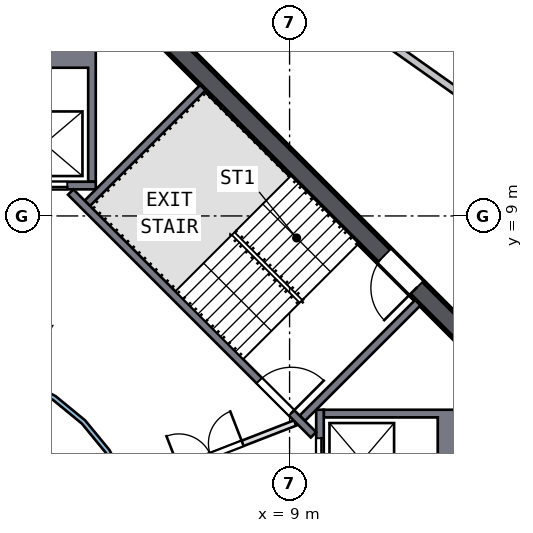
"""IFC4 building model, lengths in metres.
Left out: names, types, materials, properties, quantities, classifications, styles, units other than length and angle.
Written with IfcOpenShell. Run it as: python <this file> out.ifc"""

import sys

from ifc_helpers import new_model, si_unit, direction, frame, frame_2d, origin, place, context, subcontext, project, spatial, polyline, rectangle, outline, extrude, element, fill, save


model = new_model("IFC4")
c1 = context("Model", 3, precision=1e-05, world=origin(), true_north=direction((0.0, 1.0)))
c2 = subcontext(c1, "Body", "Model", "MODEL_VIEW")
j1 = project(units=[si_unit("LENGTHUNIT", "METRE"), si_unit("PLANEANGLEUNIT", "RADIAN")], contexts=[c1])
p1 = place(None, origin())
s1 = spatial("IfcSite", under=j1, at=p1, CompositionType="ELEMENT")
p2 = place(p1, origin())
s2 = spatial("IfcBuilding", under=s1, at=p2, CompositionType="ELEMENT")
p3 = place(p2, frame((0.0, 0.0, 256.0)))
s3 = spatial("IfcBuildingStorey", under=s2, at=p3, CompositionType="ELEMENT", Elevation=256.0)
p4 = place(p3, frame((13.823, 5.622, 0.0), z_axis=(0.0, 0.0, 1.0), x_axis=(-0.707106781, 0.707106781, 0.0)))
e1 = element("IfcWall", 1, at=p4, inside=s3, PredefinedType="SHEAR", context=c2, shape_type="SweptSolid", body=[
    extrude(rectangle(XDim=11.598, YDim=0.5, at=frame_2d((5.799, 0.0))), origin(), (0.0, 0.0, 1.0), 3.5),
])
p5 = place(p4, frame((2.099, 0.0, 0.0)))
e2 = element("IfcOpeningElement", 2, at=p5, cuts=e1, PredefinedType="OPENING", context=c2, shape_type="SweptSolid", body=[
    extrude(rectangle(XDim=1.2, YDim=2.1, at=frame_2d((0.6, 1.05))), frame((0.0, 0.26, 0.0), z_axis=(0.0, -1.0, 0.0), x_axis=(1.0, 0.0, 0.0)), (0.0, 0.0, 1.0), 0.52),
])
p6 = place(p3, origin())
e3 = element("IfcWall", 3, at=p6, inside=s3, PredefinedType="SOLIDWALL", context=c2, shape_type="SweptSolid", body=[
    extrude(outline(polyline([(13.5, 3.9), (13.5, 1.2), (9.9, 1.2), (9.9, 1.4), (12.9, 1.4), (12.9, 3.7), (9.9, 3.7), (9.9, 3.9), (13.5, 3.9)])), origin(), (0.0, 0.0, 1.0), 3.19),
])
p7 = place(p3, frame((9.8, 1.2, 0.0), z_axis=(0.0, 0.0, 1.0), x_axis=(0.0, 1.0, 0.0)))
e4 = element("IfcWall", 4, at=p7, inside=s3, PredefinedType="SOLIDWALL", context=c2, shape_type="SweptSolid", body=[
    extrude(rectangle(XDim=2.7, YDim=0.2, at=frame_2d((1.35, 0.0))), origin(), (0.0, 0.0, 1.0), 3.19),
])
p8 = place(p7, frame((0.75, 0.0, 0.0)))
e5 = element("IfcOpeningElement", 5, at=p8, cuts=e4, PredefinedType="OPENING", context=c2, shape_type="SweptSolid", body=[
    extrude(rectangle(XDim=1.2, YDim=2.1, at=frame_2d((0.6, 1.05))), frame((0.0, 0.11, 0.0), z_axis=(0.0, -1.0, 0.0), x_axis=(1.0, 0.0, 0.0)), (0.0, 0.0, 1.0), 0.22),
])
p9 = place(p3, origin())
e6 = element("IfcWall", 6, at=p9, inside=s3, PredefinedType="SOLIDWALL", context=c2, shape_type="SweptSolid", body=[
    extrude(outline(polyline([(3.9, 9.9), (3.7, 9.9), (3.7, 12.9), (1.4, 12.9), (1.4, 9.9), (1.2, 9.9), (1.2, 13.5), (3.9, 13.5), (3.9, 9.9)])), origin(), (0.0, 0.0, 1.0), 3.19),
])
p10 = place(p3, frame((1.2, 9.8, 0.0), z_axis=(0.0, 0.0, 1.0), x_axis=(1.0, 0.0, 0.0)))
e7 = element("IfcWall", 7, at=p10, inside=s3, PredefinedType="SOLIDWALL", context=c2, shape_type="SweptSolid", body=[
    extrude(rectangle(XDim=2.7, YDim=0.2, at=frame_2d((1.35, 0.0))), origin(), (0.0, 0.0, 1.0), 3.19),
])
p11 = place(p10, frame((0.75, 0.0, 0.0)))
e8 = element("IfcOpeningElement", 8, at=p11, cuts=e7, PredefinedType="OPENING", context=c2, shape_type="SweptSolid", body=[
    extrude(rectangle(XDim=1.2, YDim=2.1, at=frame_2d((0.6, 1.05))), frame((0.0, 0.11, 0.0), z_axis=(0.0, -1.0, 0.0), x_axis=(1.0, 0.0, 0.0)), (0.0, 0.0, 1.0), 0.22),
])
p12 = place(p3, frame((3.24, 9.629, 0.0), z_axis=(0.0, 0.0, 1.0), x_axis=(0.707106781, -0.707106781, 0.0)))
e9 = element("IfcWall", 9, at=p12, inside=s3, PredefinedType="SOLIDWALL", context=c2, shape_type="SweptSolid", body=[
    extrude(rectangle(XDim=9.036, YDim=0.2, at=frame_2d((4.518, 0.0))), origin(), (0.0, 0.0, 1.0), 3.19),
])
p13 = place(p12, frame((7.018, 0.0, 0.0)))
e10 = element("IfcOpeningElement", 10, at=p13, cuts=e9, PredefinedType="OPENING", context=c2, shape_type="SweptSolid", body=[
    extrude(rectangle(XDim=1.2, YDim=2.1, at=frame_2d((0.6, 1.05))), frame((0.0, 0.11, 0.0), z_axis=(0.0, -1.0, 0.0), x_axis=(1.0, 0.0, 0.0)), (0.0, 0.0, 1.0), 0.22),
])
for number, where, z_axis, x_axis in (
    (11, (9.334, 3.677, 0.0), (0.0, 0.0, 1.0), (0.707, 0.707, 0.0)),
    (12, (3.677, 9.334, 0.0), (0.0, 0.0, 1.0), (0.707, 0.707, 0.0)),
):
    element("IfcWall", number, at=place(p3, frame(where, z_axis=z_axis, x_axis=x_axis)), inside=s3, PredefinedType="SOLIDWALL", context=c2, shape_type="SweptSolid", body=[
        extrude(rectangle(XDim=4.3, YDim=0.2, at=frame_2d((2.15, 0.0))), origin(), (0.0, 0.0, 1.0), 3.19),
    ])
p14 = place(p3, frame((4.782, 1.857, 0.0), z_axis=(0.0, 0.0, 1.0), x_axis=(0.932155279, 0.362058746, 0.0)))
e13 = element("IfcWall", 13, at=p14, inside=s3, PredefinedType="PARTITIONING", context=c2, shape_type="SweptSolid", body=[
    extrude(rectangle(XDim=4.682, YDim=0.15, at=frame_2d((2.341, 0.0))), origin(), (0.0, 0.0, 1.0), 3.19),
])
p15 = place(p14, frame((1.4, 0.0, 0.0)))
e14 = element("IfcOpeningElement", 14, at=p15, cuts=e13, PredefinedType="OPENING", context=c2, shape_type="SweptSolid", body=[
    extrude(rectangle(XDim=1.8, YDim=2.1, at=frame_2d((0.9, 1.05))), frame((0.0, 0.085, 0.0), z_axis=(0.0, -1.0, 0.0), x_axis=(1.0, 0.0, 0.0)), (0.0, 0.0, 1.0), 0.17),
])
p16 = place(p3, origin())
e15 = element("IfcWall", 15, at=p16, inside=s3, PredefinedType="SOLIDWALL", context=c2, shape_type="SweptSolid", body=[
    extrude(outline(polyline([(5.021, -0.999), (4.73, -1.959), (4.257, -2.844), (3.62, -3.62), (2.844, -4.257), (1.959, -4.73), (0.999, -5.021), (0.0, -5.12), (-0.999, -5.021), (-1.959, -4.73), (-2.844, -4.257), (-3.62, -3.62), (-4.257, -2.844), (-4.73, -1.959), (-5.021, -0.999), (-5.12, 0.0), (-5.021, 0.999), (-4.73, 1.959), (-4.257, 2.844), (-3.62, 3.62), (-2.844, 4.257), (-1.959, 4.73), (-0.999, 5.021), (0.0, 5.12), (0.999, 5.021), (1.959, 4.73), (2.844, 4.257), (3.62, 3.62), (4.257, 2.844), (4.73, 1.959), (5.021, 0.999), (5.12, 0.0), (5.021, -0.999)]), holes=[polyline([(4.904, 0.976), (4.619, 1.913), (4.157, 2.778), (3.535, 3.535), (2.778, 4.157), (1.913, 4.619), (0.976, 4.904), (0.0, 5.0), (-0.976, 4.904), (-1.913, 4.619), (-2.778, 4.157), (-3.535, 3.535), (-4.157, 2.778), (-4.619, 1.913), (-4.904, 0.976), (-5.0, 0.0), (-4.904, -0.976), (-4.619, -1.913), (-4.157, -2.778), (-3.535, -3.535), (-2.778, -4.157), (-1.913, -4.619), (-0.976, -4.904), (0.0, -5.0), (0.976, -4.904), (1.913, -4.619), (2.778, -4.157), (3.535, -3.535), (4.157, -2.778), (4.619, -1.913), (4.904, -0.976), (5.0, 0.0), (4.904, 0.976)])]), origin(), (0.0, 0.0, 1.0), 3.19),
])
p17 = place(p3, frame((6.373, 17.245, 0.0), z_axis=(0.0, 0.0, 1.0), x_axis=(0.816328241, -0.577588264, 0.0)))
e16 = element("IfcWall", 16, at=p17, inside=s3, PredefinedType="SOLIDWALL", context=c2, shape_type="SweptSolid", body=[
    extrude(rectangle(XDim=9.316, YDim=0.2, at=frame_2d((4.658, 0.0))), origin(), (0.0, 0.0, 1.0), 3.19),
])
p18 = place(p17, frame((5.15, 0.0, 0.0)))
e17 = element("IfcOpeningElement", 17, at=p18, cuts=e16, PredefinedType="OPENING", context=c2, shape_type="SweptSolid", body=[
    extrude(rectangle(XDim=1.0, YDim=2.1, at=frame_2d((0.5, 1.05))), frame((0.0, 0.11, 0.0), z_axis=(0.0, -1.0, 0.0), x_axis=(1.0, 0.0, 0.0)), (0.0, 0.0, 1.0), 0.22),
])
p19 = place(p8, origin())
e18 = element("IfcDoor", 18, at=p19, inside=s3, OperationType="DOUBLE_DOOR_SLIDING", PredefinedType="DOOR", context=c2, shape_type="SweptSolid", body=[
    extrude(rectangle(XDim=1.2, YDim=2.1, at=frame_2d((0.6, 1.05))), frame((0.0, 0.025, 0.0), z_axis=(0.0, -1.0, 0.0), x_axis=(1.0, 0.0, 0.0)), (0.0, 0.0, 1.0), 0.05),
])
fill(e5, e18)
p20 = place(p11, origin())
e19 = element("IfcDoor", 19, at=p20, inside=s3, OperationType="DOUBLE_DOOR_SLIDING", PredefinedType="DOOR", context=c2, shape_type="SweptSolid", body=[
    extrude(rectangle(XDim=1.2, YDim=2.1, at=frame_2d((0.6, 1.05))), frame((0.0, 0.025, 0.0), z_axis=(0.0, -1.0, 0.0), x_axis=(1.0, 0.0, 0.0)), (0.0, 0.0, 1.0), 0.05),
])
fill(e8, e19)
p21 = place(p13, origin())
e20 = element("IfcDoor", 20, at=p21, inside=s3, OperationType="SINGLE_SWING_RIGHT", PredefinedType="DOOR", context=c2, shape_type="SweptSolid", body=[
    extrude(rectangle(XDim=1.2, YDim=2.1, at=frame_2d((0.6, 1.05))), frame((0.0, 0.025, 0.0), z_axis=(0.0, -1.0, 0.0), x_axis=(1.0, 0.0, 0.0)), (0.0, 0.0, 1.0), 0.05),
])
fill(e10, e20)
p22 = place(p5, origin())
e21 = element("IfcDoor", 21, at=p22, inside=s3, OperationType="SINGLE_SWING_LEFT", PredefinedType="DOOR", context=c2, shape_type="SweptSolid", body=[
    extrude(rectangle(XDim=1.2, YDim=2.1, at=frame_2d((0.6, 1.05))), frame((0.0, 0.025, 0.0), z_axis=(0.0, -1.0, 0.0), x_axis=(1.0, 0.0, 0.0)), (0.0, 0.0, 1.0), 0.05),
])
fill(e2, e21)
p23 = place(p15, origin())
e22 = element("IfcDoor", 22, at=p23, inside=s3, OperationType="DOUBLE_DOOR_SINGLE_SWING", PredefinedType="DOOR", context=c2, shape_type="SweptSolid", body=[
    extrude(rectangle(XDim=1.8, YDim=2.1, at=frame_2d((0.9, 1.05))), frame((0.0, 0.025, 0.0), z_axis=(0.0, -1.0, 0.0), x_axis=(1.0, 0.0, 0.0)), (0.0, 0.0, 1.0), 0.05),
])
fill(e14, e22)
save(model, sys.argv[1])
